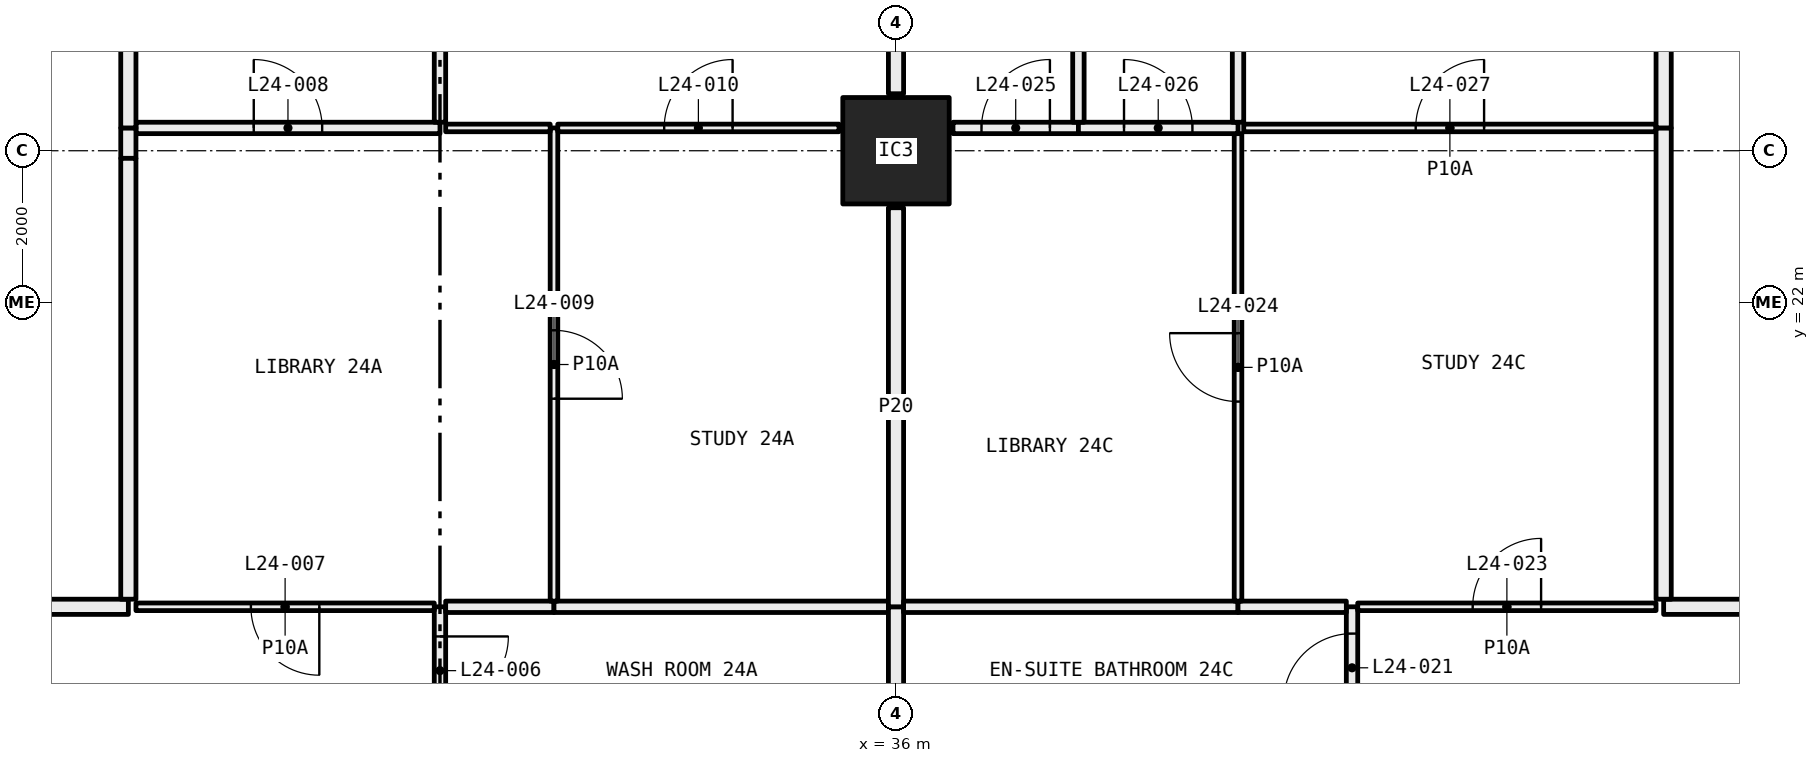
"""IFC4 building model, lengths in metres.
Left out: names, types, materials, properties, quantities, classifications, styles, units other than length and angle.
Written with IfcOpenShell. Run it as: python <this file> out.ifc"""

import sys

from ifc_helpers import new_model, si_unit, direction, frame, frame_2d, origin, origin_2d, place, context, subcontext, project, spatial, rectangle, hollow_rectangle, extrude, element, fill, save


model = new_model("IFC4")
c1 = context("Model", 3, precision=1e-05, world=origin(), true_north=direction((0.0, 1.0)))
c2 = subcontext(c1, "Body", "Model", "MODEL_VIEW")
j1 = project(units=[si_unit("LENGTHUNIT", "METRE"), si_unit("PLANEANGLEUNIT", "RADIAN")], contexts=[c1])
p1 = place(None, origin())
s1 = spatial("IfcSite", under=j1, at=p1, CompositionType="ELEMENT")
p2 = place(p1, origin())
s2 = spatial("IfcBuilding", under=s1, at=p2, CompositionType="ELEMENT")
p3 = place(p2, frame((0.0, 0.0, 96.6)))
s3 = spatial("IfcBuildingStorey", under=s2, at=p3, CompositionType="ELEMENT", Elevation=96.6)
p4 = place(p3, frame((36.0, 24.0, 0.0), z_axis=(0.0, 0.0, 1.0), x_axis=(1.0, 0.0, 0.0)))
e1 = element("IfcColumn", 1, at=p4, inside=s3, PredefinedType="COLUMN", context=c2, shape_type="SweptSolid", body=[
    extrude(hollow_rectangle(XDim=1.4, YDim=1.4, WallThickness=0.06, at=origin_2d()), origin(), (0.0, 0.0, 1.0), 3.05),
])
p5 = place(p3, frame((30.0, 16.32, 0.0), z_axis=(0.0, 0.0, 1.0), x_axis=(0.0, 1.0, 0.0)))
e2 = element("IfcWall", 2, at=p5, inside=s3, PredefinedType="PARTITIONING", context=c2, shape_type="SweptSolid", body=[
    extrude(rectangle(XDim=1.68, YDim=0.15, at=frame_2d((0.84, 0.0))), origin(), (0.0, 0.0, 1.0), 3.05),
])
p6 = place(p5, frame((0.39, 0.0, 0.0)))
e3 = element("IfcOpeningElement", 3, at=p6, cuts=e2, PredefinedType="OPENING", context=c2, shape_type="SweptSolid", body=[
    extrude(rectangle(XDim=0.9, YDim=2.1, at=frame_2d((0.45, 1.05))), frame((0.0, 0.085, 0.0), z_axis=(0.0, -1.0, 0.0), x_axis=(1.0, 0.0, 0.0)), (0.0, 0.0, 1.0), 0.17),
])
p7 = place(p3, frame((29.925, 18.0, 0.0), z_axis=(0.0, 0.0, 1.0), x_axis=(-1.0, 0.0, 0.0)))
e4 = element("IfcWall", 4, at=p7, inside=s3, PredefinedType="PARTITIONING", context=c2, shape_type="SweptSolid", body=[
    extrude(rectangle(XDim=3.925, YDim=0.1, at=frame_2d((1.962, 0.0))), origin(), (0.0, 0.0, 1.0), 3.05),
])
p8 = place(p7, frame((1.512, 0.0, 0.0)))
e5 = element("IfcOpeningElement", 5, at=p8, cuts=e4, PredefinedType="OPENING", context=c2, shape_type="SweptSolid", body=[
    extrude(rectangle(XDim=0.9, YDim=2.1, at=frame_2d((0.45, 1.05))), frame((0.0, 0.06, 0.0), z_axis=(0.0, -1.0, 0.0), x_axis=(1.0, 0.0, 0.0)), (0.0, 0.0, 1.0), 0.12),
])
p9 = place(p3, frame((25.9, 18.0, 0.0), z_axis=(0.0, 0.0, 1.0), x_axis=(-1.0, 0.0, 0.0)))
e6 = element("IfcWall", 6, at=p9, inside=s3, PredefinedType="PARTITIONING", context=c2, shape_type="SweptSolid", body=[
    extrude(rectangle(XDim=1.9, YDim=0.2, at=frame_2d((0.95, 0.0))), origin(), (0.0, 0.0, 1.0), 3.05),
])
p10 = place(p3, frame((31.5, 18.0, 0.0), z_axis=(0.0, 0.0, 1.0), x_axis=(-1.0, 0.0, 0.0)))
e7 = element("IfcWall", 7, at=p10, inside=s3, PredefinedType="PARTITIONING", context=c2, shape_type="SweptSolid", body=[
    extrude(rectangle(XDim=1.425, YDim=0.15, at=frame_2d((0.712, 0.0))), origin(), (0.0, 0.0, 1.0), 3.05),
])
p11 = place(p3, frame((35.9, 18.0, 0.0), z_axis=(0.0, 0.0, 1.0), x_axis=(-1.0, 0.0, 0.0)))
e8 = element("IfcWall", 8, at=p11, inside=s3, PredefinedType="PARTITIONING", context=c2, shape_type="SweptSolid", body=[
    extrude(rectangle(XDim=4.4, YDim=0.15, at=frame_2d((2.2, 0.0))), origin(), (0.0, 0.0, 1.0), 3.05),
])
p12 = place(p3, frame((36.0, 16.32, 0.0), z_axis=(0.0, 0.0, 1.0), x_axis=(0.0, 1.0, 0.0)))
e9 = element("IfcWall", 9, at=p12, inside=s3, PredefinedType="PARTITIONING", context=c2, shape_type="SweptSolid", body=[
    extrude(rectangle(XDim=1.68, YDim=0.2, at=frame_2d((0.84, 0.0))), origin(), (0.0, 0.0, 1.0), 2.45),
])
p13 = place(p3, frame((31.5, 18.075, 0.0), z_axis=(0.0, 0.0, 1.0), x_axis=(0.0, 1.0, 0.0)))
e10 = element("IfcWall", 10, at=p13, inside=s3, PredefinedType="PARTITIONING", context=c2, shape_type="SweptSolid", body=[
    extrude(rectangle(XDim=6.225, YDim=0.1, at=frame_2d((3.113, 0.0))), origin(), (0.0, 0.0, 1.0), 2.45),
])
p14 = place(p13, frame((2.663, 0.0, 0.0)))
e11 = element("IfcOpeningElement", 11, at=p14, cuts=e10, PredefinedType="OPENING", context=c2, shape_type="SweptSolid", body=[
    extrude(rectangle(XDim=0.9, YDim=2.1, at=frame_2d((0.45, 1.05))), frame((0.0, 0.06, 0.0), z_axis=(0.0, -1.0, 0.0), x_axis=(1.0, 0.0, 0.0)), (0.0, 0.0, 1.0), 0.12),
])
p15 = place(p3, frame((30.0, 24.3, 0.0), z_axis=(0.0, 0.0, 1.0), x_axis=(-1.0, 0.0, 0.0)))
e12 = element("IfcWall", 12, at=p15, inside=s3, PredefinedType="PARTITIONING", context=c2, shape_type="SweptSolid", body=[
    extrude(rectangle(XDim=4.0, YDim=0.15, at=frame_2d((2.0, 0.0))), origin(), (0.0, 0.0, 1.0), 3.05),
])
p16 = place(p15, frame((1.55, 0.0, 0.0)))
e13 = element("IfcOpeningElement", 13, at=p16, cuts=e12, PredefinedType="OPENING", context=c2, shape_type="SweptSolid", body=[
    extrude(rectangle(XDim=0.9, YDim=2.1, at=frame_2d((0.45, 1.05))), frame((0.0, 0.085, 0.0), z_axis=(0.0, -1.0, 0.0), x_axis=(1.0, 0.0, 0.0)), (0.0, 0.0, 1.0), 0.17),
])
p17 = place(p3, frame((31.45, 24.3, 0.0), z_axis=(0.0, 0.0, 1.0), x_axis=(-1.0, 0.0, 0.0)))
e14 = element("IfcWall", 14, at=p17, inside=s3, PredefinedType="PARTITIONING", context=c2, shape_type="SweptSolid", body=[
    extrude(rectangle(XDim=1.375, YDim=0.1, at=frame_2d((0.688, 0.0))), origin(), (0.0, 0.0, 1.0), 3.05),
])
p18 = place(p3, frame((25.9, 24.3, 0.0), z_axis=(0.0, 0.0, 1.0), x_axis=(0.0, -1.0, 0.0)))
e15 = element("IfcWall", 15, at=p18, inside=s3, PredefinedType="PARTITIONING", context=c2, shape_type="SweptSolid", body=[
    extrude(rectangle(XDim=0.4, YDim=0.2, at=frame_2d((0.2, 0.0))), origin(), (0.0, 0.0, 1.0), 2.45),
])
p19 = place(p3, frame((25.9, 23.9, 0.0), z_axis=(0.0, 0.0, 1.0), x_axis=(0.0, -1.0, 0.0)))
e16 = element("IfcWall", 16, at=p19, inside=s3, PredefinedType="PARTITIONING", context=c2, shape_type="SweptSolid", body=[
    extrude(rectangle(XDim=5.8, YDim=0.2, at=frame_2d((2.9, 0.0))), origin(), (0.0, 0.0, 1.0), 3.05),
])
p20 = place(p3, frame((35.25, 24.3, 0.0), z_axis=(0.0, 0.0, 1.0), x_axis=(-1.0, 0.0, 0.0)))
e17 = element("IfcWall", 17, at=p20, inside=s3, PredefinedType="PARTITIONING", context=c2, shape_type="SweptSolid", body=[
    extrude(rectangle(XDim=3.7, YDim=0.1, at=frame_2d((1.85, 0.0))), origin(), (0.0, 0.0, 1.0), 3.05),
])
p21 = place(p20, frame((1.4, 0.0, 0.0)))
e18 = element("IfcOpeningElement", 18, at=p21, cuts=e17, PredefinedType="OPENING", context=c2, shape_type="SweptSolid", body=[
    extrude(rectangle(XDim=0.9, YDim=2.1, at=frame_2d((0.45, 1.05))), frame((0.0, 0.06, 0.0), z_axis=(0.0, -1.0, 0.0), x_axis=(1.0, 0.0, 0.0)), (0.0, 0.0, 1.0), 0.12),
])
p22 = place(p3, frame((36.0, 18.0, 0.0), z_axis=(0.0, 0.0, 1.0), x_axis=(0.0, 1.0, 0.0)))
e19 = element("IfcWall", 19, at=p22, inside=s3, PredefinedType="PARTITIONING", context=c2, shape_type="SweptSolid", body=[
    extrude(rectangle(XDim=5.25, YDim=0.2, at=frame_2d((2.625, 0.0))), origin(), (0.0, 0.0, 1.0), 2.45),
])
p23 = place(p3, frame((30.0, 24.375, 0.0), z_axis=(0.0, 0.0, 1.0), x_axis=(0.0, 1.0, 0.0)))
e20 = element("IfcWall", 20, at=p23, inside=s3, PredefinedType="PARTITIONING", context=c2, shape_type="SweptSolid", body=[
    extrude(rectangle(XDim=4.325, YDim=0.15, at=frame_2d((2.163, 0.0))), origin(), (0.0, 0.0, 1.0), 3.05),
])
p24 = place(p3, frame((25.9, 28.7, 0.0), z_axis=(0.0, 0.0, 1.0), x_axis=(0.0, -1.0, 0.0)))
e21 = element("IfcWall", 21, at=p24, inside=s3, PredefinedType="PARTITIONING", context=c2, shape_type="SweptSolid", body=[
    extrude(rectangle(XDim=4.4, YDim=0.2, at=frame_2d((2.2, 0.0))), origin(), (0.0, 0.0, 1.0), 3.05),
])
p25 = place(p3, frame((36.0, 24.75, 0.0), z_axis=(0.0, 0.0, 1.0), x_axis=(0.0, 1.0, 0.0)))
e22 = element("IfcWall", 22, at=p25, inside=s3, PredefinedType="PARTITIONING", context=c2, shape_type="SweptSolid", body=[
    extrude(rectangle(XDim=1.8, YDim=0.2, at=frame_2d((0.9, 0.0))), origin(), (0.0, 0.0, 1.0), 2.45),
])
p26 = place(p3, frame((42.0, 16.395, 0.0), z_axis=(0.0, 0.0, 1.0), x_axis=(0.0, 1.0, 0.0)))
e23 = element("IfcWall", 23, at=p26, inside=s3, PredefinedType="PARTITIONING", context=c2, shape_type="SweptSolid", body=[
    extrude(rectangle(XDim=1.605, YDim=0.15, at=frame_2d((0.802, 0.0))), origin(), (0.0, 0.0, 1.0), 3.05),
])
p27 = place(p26, frame((0.353, 0.0, 0.0)))
e24 = element("IfcOpeningElement", 24, at=p27, cuts=e23, PredefinedType="OPENING", context=c2, shape_type="SweptSolid", body=[
    extrude(rectangle(XDim=0.9, YDim=2.1, at=frame_2d((0.45, 1.05))), frame((0.0, 0.085, 0.0), z_axis=(0.0, -1.0, 0.0), x_axis=(1.0, 0.0, 0.0)), (0.0, 0.0, 1.0), 0.17),
])
p28 = place(p3, frame((40.5, 18.0, 0.0), z_axis=(0.0, 0.0, 1.0), x_axis=(-1.0, 0.0, 0.0)))
e25 = element("IfcWall", 25, at=p28, inside=s3, PredefinedType="PARTITIONING", context=c2, shape_type="SweptSolid", body=[
    extrude(rectangle(XDim=4.4, YDim=0.15, at=frame_2d((2.2, 0.0))), origin(), (0.0, 0.0, 1.0), 3.05),
])
p29 = place(p3, frame((41.925, 18.0, 0.0), z_axis=(0.0, 0.0, 1.0), x_axis=(-1.0, 0.0, 0.0)))
e26 = element("IfcWall", 26, at=p29, inside=s3, PredefinedType="PARTITIONING", context=c2, shape_type="SweptSolid", body=[
    extrude(rectangle(XDim=1.425, YDim=0.15, at=frame_2d((0.712, 0.0))), origin(), (0.0, 0.0, 1.0), 3.05),
])
p30 = place(p3, frame((46.0, 18.0, 0.0), z_axis=(0.0, 0.0, 1.0), x_axis=(-1.0, 0.0, 0.0)))
e27 = element("IfcWall", 27, at=p30, inside=s3, PredefinedType="PARTITIONING", context=c2, shape_type="SweptSolid", body=[
    extrude(rectangle(XDim=3.925, YDim=0.1, at=frame_2d((1.962, 0.0))), origin(), (0.0, 0.0, 1.0), 3.05),
])
p31 = place(p30, frame((1.512, 0.0, 0.0)))
e28 = element("IfcOpeningElement", 28, at=p31, cuts=e27, PredefinedType="OPENING", context=c2, shape_type="SweptSolid", body=[
    extrude(rectangle(XDim=0.9, YDim=2.1, at=frame_2d((0.45, 1.05))), frame((0.0, 0.06, 0.0), z_axis=(0.0, -1.0, 0.0), x_axis=(1.0, 0.0, 0.0)), (0.0, 0.0, 1.0), 0.12),
])
p32 = place(p3, frame((54.0, 18.0, 0.0), z_axis=(0.0, 0.0, 1.0), x_axis=(-1.0, 0.0, 0.0)))
e29 = element("IfcWall", 29, at=p32, inside=s3, PredefinedType="PARTITIONING", context=c2, shape_type="SweptSolid", body=[
    extrude(rectangle(XDim=7.9, YDim=0.2, at=frame_2d((3.95, 0.0))), origin(), (0.0, 0.0, 1.0), 3.05),
])
p33 = place(p3, frame((40.5, 18.075, 0.0), z_axis=(0.0, 0.0, 1.0), x_axis=(0.0, 1.0, 0.0)))
e30 = element("IfcWall", 30, at=p33, inside=s3, PredefinedType="PARTITIONING", context=c2, shape_type="SweptSolid", body=[
    extrude(rectangle(XDim=6.15, YDim=0.1, at=frame_2d((3.075, 0.0))), origin(), (0.0, 0.0, 1.0), 2.45),
])
p34 = place(p33, frame((2.625, 0.0, 0.0)))
e31 = element("IfcOpeningElement", 31, at=p34, cuts=e30, PredefinedType="OPENING", context=c2, shape_type="SweptSolid", body=[
    extrude(rectangle(XDim=0.9, YDim=2.1, at=frame_2d((0.45, 1.05))), frame((0.0, 0.06, 0.0), z_axis=(0.0, -1.0, 0.0), x_axis=(1.0, 0.0, 0.0)), (0.0, 0.0, 1.0), 0.12),
])
p35 = place(p3, frame((38.4, 24.3, 0.0), z_axis=(0.0, 0.0, 1.0), x_axis=(-1.0, 0.0, 0.0)))
e32 = element("IfcWall", 32, at=p35, inside=s3, PredefinedType="PARTITIONING", context=c2, shape_type="SweptSolid", body=[
    extrude(rectangle(XDim=1.65, YDim=0.15, at=frame_2d((0.825, 0.0))), origin(), (0.0, 0.0, 1.0), 3.05),
])
p36 = place(p35, frame((0.375, 0.0, 0.0)))
e33 = element("IfcOpeningElement", 33, at=p36, cuts=e32, PredefinedType="OPENING", context=c2, shape_type="SweptSolid", body=[
    extrude(rectangle(XDim=0.9, YDim=2.1, at=frame_2d((0.45, 1.05))), frame((0.0, 0.085, 0.0), z_axis=(0.0, -1.0, 0.0), x_axis=(1.0, 0.0, 0.0)), (0.0, 0.0, 1.0), 0.17),
])
p37 = place(p3, frame((40.5, 24.3, 0.0), z_axis=(0.0, 0.0, 1.0), x_axis=(-1.0, 0.0, 0.0)))
e34 = element("IfcWall", 34, at=p37, inside=s3, PredefinedType="PARTITIONING", context=c2, shape_type="SweptSolid", body=[
    extrude(rectangle(XDim=2.1, YDim=0.15, at=frame_2d((1.05, 0.0))), origin(), (0.0, 0.0, 1.0), 3.05),
])
p38 = place(p37, frame((0.6, 0.0, 0.0)))
e35 = element("IfcOpeningElement", 35, at=p38, cuts=e34, PredefinedType="OPENING", context=c2, shape_type="SweptSolid", body=[
    extrude(rectangle(XDim=0.9, YDim=2.1, at=frame_2d((0.45, 1.05))), frame((0.0, 0.085, 0.0), z_axis=(0.0, -1.0, 0.0), x_axis=(1.0, 0.0, 0.0)), (0.0, 0.0, 1.0), 0.17),
])
p39 = place(p3, frame((46.0, 24.3, 0.0), z_axis=(0.0, 0.0, 1.0), x_axis=(-1.0, 0.0, 0.0)))
e36 = element("IfcWall", 36, at=p39, inside=s3, PredefinedType="PARTITIONING", context=c2, shape_type="SweptSolid", body=[
    extrude(rectangle(XDim=5.425, YDim=0.1, at=frame_2d((2.712, 0.0))), origin(), (0.0, 0.0, 1.0), 3.05),
])
p40 = place(p39, frame((2.262, 0.0, 0.0)))
e37 = element("IfcOpeningElement", 37, at=p40, cuts=e36, PredefinedType="OPENING", context=c2, shape_type="SweptSolid", body=[
    extrude(rectangle(XDim=0.9, YDim=2.1, at=frame_2d((0.45, 1.05))), frame((0.0, 0.06, 0.0), z_axis=(0.0, -1.0, 0.0), x_axis=(1.0, 0.0, 0.0)), (0.0, 0.0, 1.0), 0.12),
])
p41 = place(p3, frame((46.1, 18.1, 0.0), z_axis=(0.0, 0.0, 1.0), x_axis=(0.0, 1.0, 0.0)))
e38 = element("IfcWall", 38, at=p41, inside=s3, PredefinedType="PARTITIONING", context=c2, shape_type="SweptSolid", body=[
    extrude(rectangle(XDim=6.2, YDim=0.2, at=frame_2d((3.1, 0.0))), origin(), (0.0, 0.0, 1.0), 2.45),
])
p42 = place(p3, frame((38.4, 24.375, 0.0), z_axis=(0.0, 0.0, 1.0), x_axis=(0.0, 1.0, 0.0)))
e39 = element("IfcWall", 39, at=p42, inside=s3, PredefinedType="PARTITIONING", context=c2, shape_type="SweptSolid", body=[
    extrude(rectangle(XDim=2.1, YDim=0.15, at=frame_2d((1.05, 0.0))), origin(), (0.0, 0.0, 1.0), 3.05),
])
p43 = place(p3, frame((40.5, 24.375, 0.0), z_axis=(0.0, 0.0, 1.0), x_axis=(0.0, 1.0, 0.0)))
e40 = element("IfcWall", 40, at=p43, inside=s3, PredefinedType="PARTITIONING", context=c2, shape_type="SweptSolid", body=[
    extrude(rectangle(XDim=4.325, YDim=0.15, at=frame_2d((2.163, 0.0))), origin(), (0.0, 0.0, 1.0), 3.05),
])
p44 = place(p3, frame((46.1, 24.3, 0.0), z_axis=(0.0, 0.0, 1.0), x_axis=(0.0, 1.0, 0.0)))
e41 = element("IfcWall", 41, at=p44, inside=s3, PredefinedType="PARTITIONING", context=c2, shape_type="SweptSolid", body=[
    extrude(rectangle(XDim=4.5, YDim=0.2, at=frame_2d((2.25, 0.0))), origin(), (0.0, 0.0, 1.0), 3.05),
])
p45 = place(p6, frame((0.9, 0.0, 0.0), x_axis=(-1.0, 0.0, 0.0)))
e42 = element("IfcDoor", 42, at=p45, inside=s3, OperationType="SINGLE_SWING_RIGHT", PredefinedType="DOOR", context=c2, shape_type="SweptSolid", body=[
    extrude(rectangle(XDim=0.9, YDim=2.1, at=frame_2d((0.45, 1.05))), frame((0.0, 0.025, 0.0), z_axis=(0.0, -1.0, 0.0), x_axis=(1.0, 0.0, 0.0)), (0.0, 0.0, 1.0), 0.05),
])
fill(e3, e42)
p46 = place(p8, origin())
e43 = element("IfcDoor", 43, at=p46, inside=s3, OperationType="SINGLE_SWING_RIGHT", PredefinedType="DOOR", context=c2, shape_type="SweptSolid", body=[
    extrude(rectangle(XDim=0.9, YDim=2.1, at=frame_2d((0.45, 1.05))), frame((0.0, 0.025, 0.0), z_axis=(0.0, -1.0, 0.0), x_axis=(1.0, 0.0, 0.0)), (0.0, 0.0, 1.0), 0.05),
])
fill(e5, e43)
p47 = place(p16, frame((0.9, 0.0, 0.0), x_axis=(-1.0, 0.0, 0.0)))
e44 = element("IfcDoor", 44, at=p47, inside=s3, OperationType="SINGLE_SWING_RIGHT", PredefinedType="DOOR", context=c2, shape_type="SweptSolid", body=[
    extrude(rectangle(XDim=0.9, YDim=2.1, at=frame_2d((0.45, 1.05))), frame((0.0, 0.025, 0.0), z_axis=(0.0, -1.0, 0.0), x_axis=(1.0, 0.0, 0.0)), (0.0, 0.0, 1.0), 0.05),
])
fill(e13, e44)
p48 = place(p14, frame((0.9, 0.0, 0.0), x_axis=(-1.0, 0.0, 0.0)))
e45 = element("IfcDoor", 45, at=p48, inside=s3, OperationType="SINGLE_SWING_LEFT", PredefinedType="DOOR", context=c2, shape_type="SweptSolid", body=[
    extrude(rectangle(XDim=0.9, YDim=2.1, at=frame_2d((0.45, 1.05))), frame((0.0, 0.025, 0.0), z_axis=(0.0, -1.0, 0.0), x_axis=(1.0, 0.0, 0.0)), (0.0, 0.0, 1.0), 0.05),
])
fill(e11, e45)
p49 = place(p21, frame((0.9, 0.0, 0.0), x_axis=(-1.0, 0.0, 0.0)))
e46 = element("IfcDoor", 46, at=p49, inside=s3, OperationType="SINGLE_SWING_LEFT", PredefinedType="DOOR", context=c2, shape_type="SweptSolid", body=[
    extrude(rectangle(XDim=0.9, YDim=2.1, at=frame_2d((0.45, 1.05))), frame((0.0, 0.025, 0.0), z_axis=(0.0, -1.0, 0.0), x_axis=(1.0, 0.0, 0.0)), (0.0, 0.0, 1.0), 0.05),
])
fill(e18, e46)
p50 = place(p27, origin())
e47 = element("IfcDoor", 47, at=p50, inside=s3, OperationType="SINGLE_SWING_RIGHT", PredefinedType="DOOR", context=c2, shape_type="SweptSolid", body=[
    extrude(rectangle(XDim=0.9, YDim=2.1, at=frame_2d((0.45, 1.05))), frame((0.0, 0.025, 0.0), z_axis=(0.0, -1.0, 0.0), x_axis=(1.0, 0.0, 0.0)), (0.0, 0.0, 1.0), 0.05),
])
fill(e24, e47)
p51 = place(p31, frame((0.9, 0.0, 0.0), x_axis=(-1.0, 0.0, 0.0)))
e48 = element("IfcDoor", 48, at=p51, inside=s3, OperationType="SINGLE_SWING_LEFT", PredefinedType="DOOR", context=c2, shape_type="SweptSolid", body=[
    extrude(rectangle(XDim=0.9, YDim=2.1, at=frame_2d((0.45, 1.05))), frame((0.0, 0.025, 0.0), z_axis=(0.0, -1.0, 0.0), x_axis=(1.0, 0.0, 0.0)), (0.0, 0.0, 1.0), 0.05),
])
fill(e28, e48)
p52 = place(p34, origin())
e49 = element("IfcDoor", 49, at=p52, inside=s3, OperationType="SINGLE_SWING_LEFT", PredefinedType="DOOR", context=c2, shape_type="SweptSolid", body=[
    extrude(rectangle(XDim=0.9, YDim=2.1, at=frame_2d((0.45, 1.05))), frame((0.0, 0.025, 0.0), z_axis=(0.0, -1.0, 0.0), x_axis=(1.0, 0.0, 0.0)), (0.0, 0.0, 1.0), 0.05),
])
fill(e31, e49)
p53 = place(p36, frame((0.9, 0.0, 0.0), x_axis=(-1.0, 0.0, 0.0)))
e50 = element("IfcDoor", 50, at=p53, inside=s3, OperationType="SINGLE_SWING_LEFT", PredefinedType="DOOR", context=c2, shape_type="SweptSolid", body=[
    extrude(rectangle(XDim=0.9, YDim=2.1, at=frame_2d((0.45, 1.05))), frame((0.0, 0.025, 0.0), z_axis=(0.0, -1.0, 0.0), x_axis=(1.0, 0.0, 0.0)), (0.0, 0.0, 1.0), 0.05),
])
fill(e33, e50)
p54 = place(p38, frame((0.9, 0.0, 0.0), x_axis=(-1.0, 0.0, 0.0)))
e51 = element("IfcDoor", 51, at=p54, inside=s3, OperationType="SINGLE_SWING_RIGHT", PredefinedType="DOOR", context=c2, shape_type="SweptSolid", body=[
    extrude(rectangle(XDim=0.9, YDim=2.1, at=frame_2d((0.45, 1.05))), frame((0.0, 0.025, 0.0), z_axis=(0.0, -1.0, 0.0), x_axis=(1.0, 0.0, 0.0)), (0.0, 0.0, 1.0), 0.05),
])
fill(e35, e51)
p55 = place(p40, frame((0.9, 0.0, 0.0), x_axis=(-1.0, 0.0, 0.0)))
e52 = element("IfcDoor", 52, at=p55, inside=s3, OperationType="SINGLE_SWING_LEFT", PredefinedType="DOOR", context=c2, shape_type="SweptSolid", body=[
    extrude(rectangle(XDim=0.9, YDim=2.1, at=frame_2d((0.45, 1.05))), frame((0.0, 0.025, 0.0), z_axis=(0.0, -1.0, 0.0), x_axis=(1.0, 0.0, 0.0)), (0.0, 0.0, 1.0), 0.05),
])
fill(e37, e52)
save(model, sys.argv[1])
